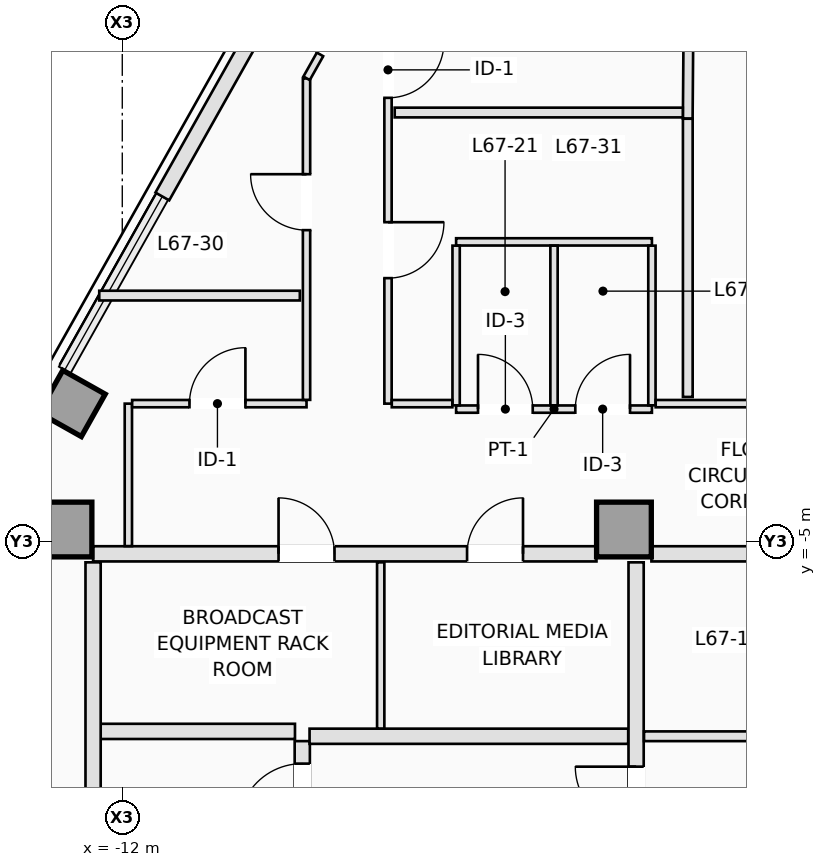
"""IFC4 building model, lengths in metres.
Left out: names, types, materials, properties, quantities, classifications, styles, units other than length and angle.
Written with IfcOpenShell. Run it as: python <this file> out.ifc"""

import sys

from ifc_helpers import new_model, si_unit, direction, frame, frame_2d, origin, origin_2d, place, context, subcontext, project, spatial, rectangle, extrude, element, fill, save


model = new_model("IFC4")
c1 = context("Model", 3, precision=1e-05, world=origin(), true_north=direction((0.0, 1.0)))
c2 = subcontext(c1, "Body", "Model", "MODEL_VIEW")
j1 = project(units=[si_unit("LENGTHUNIT", "METRE"), si_unit("PLANEANGLEUNIT", "RADIAN")], contexts=[c1])
p1 = place(None, origin())
s1 = spatial("IfcSite", under=j1, at=p1, CompositionType="ELEMENT")
p2 = place(p1, origin())
s2 = spatial("IfcBuilding", under=s1, at=p2, CompositionType="ELEMENT")
p3 = place(p2, frame((0.0, 0.0, 242.9)))
s3 = spatial("IfcBuildingStorey", under=s2, at=p3, CompositionType="ELEMENT", Elevation=242.9)
for number, where, z_axis, x_axis in (
    (1, (-12.95, -4.8, 0.0), (0.0, 0.0, 1.0), (1.0, 0.0, 0.0)),
    (2, (-3.75, -4.8, 0.0), (0.0, 0.0, 1.0), (1.0, 0.0, 0.0)),
):
    element("IfcColumn", number, at=place(p3, frame(where, z_axis=z_axis, x_axis=x_axis)), inside=s3, PredefinedType="COLUMN", context=c2, shape_type="SweptSolid", body=[
        extrude(rectangle(XDim=0.9, YDim=0.9, at=origin_2d()), origin(), (0.0, 0.0, 1.0), 3.5),
    ])
p4 = place(p3, frame((-12.825, -2.727, 0.0), z_axis=(0.0, 0.0, 1.0), x_axis=(-0.871575139605, 0.490261946333, 0.0)))
e3 = element("IfcColumn", 3, at=p4, inside=s3, PredefinedType="COLUMN", context=c2, shape_type="SweptSolid", body=[
    extrude(rectangle(XDim=0.8, YDim=0.8, at=origin_2d()), origin(), (0.0, 0.0, 1.0), 3.5),
])
p5 = place(p3, frame((-11.341, 0.677, 0.0), z_axis=(0.0, 0.0, 1.0), x_axis=(0.490268515903, 0.871571444182, 0.0)))
e4 = element("IfcWall", 4, at=p5, inside=s3, PredefinedType="STANDARD", context=c2, shape_type="SweptSolid", body=[
    extrude(rectangle(XDim=3.186, YDim=0.26, at=frame_2d((1.593, 0.0))), origin(), (0.0, 0.0, 1.0), 3.25),
])
p6 = place(p3, frame((-9.04, -10.18, 0.0), z_axis=(0.0, 0.0, 1.0), x_axis=(0.0, 1.0, 0.0)))
e5 = element("IfcWall", 5, at=p6, inside=s3, PredefinedType="PARTITIONING", context=c2, shape_type="SweptSolid", body=[
    extrude(rectangle(XDim=1.9, YDim=0.25, at=frame_2d((0.95, 0.0))), origin(), (0.0, 0.0, 1.0), 3.25),
])
p7 = place(p6, frame((0.48, 0.0, 0.0)))
e6 = element("IfcOpeningElement", 6, at=p7, cuts=e5, PredefinedType="OPENING", context=c2, shape_type="SweptSolid", body=[
    extrude(rectangle(XDim=1.05, YDim=2.15, at=frame_2d((0.525, 1.075))), frame((0.0, 0.135, 0.0), z_axis=(0.0, -1.0, 0.0), x_axis=(1.0, 0.0, 0.0)), (0.0, 0.0, 1.0), 0.27),
])
p8 = place(p3, frame((-12.38, -8.12, 0.0), z_axis=(0.0, 0.0, 1.0), x_axis=(1.0, 0.0, 0.0)))
e7 = element("IfcWall", 7, at=p8, inside=s3, PredefinedType="PARTITIONING", context=c2, shape_type="SweptSolid", body=[
    extrude(rectangle(XDim=3.22, YDim=0.25, at=frame_2d((1.61, 0.0))), origin(), (0.0, 0.0, 1.0), 3.25),
])
p9 = place(p3, frame((-12.48, -10.18, 0.0), z_axis=(0.0, 0.0, 1.0), x_axis=(0.0, 1.0, 0.0)))
e8 = element("IfcWall", 8, at=p9, inside=s3, PredefinedType="PARTITIONING", context=c2, shape_type="SweptSolid", body=[
    extrude(rectangle(XDim=4.84, YDim=0.25, at=frame_2d((2.42, 0.0))), origin(), (0.0, 0.0, 1.0), 3.25),
])
p10 = place(p3, frame((-8.92, -8.2, 0.0), z_axis=(0.0, 0.0, 1.0), x_axis=(1.0, 0.0, 0.0)))
e9 = element("IfcWall", 9, at=p10, inside=s3, PredefinedType="PARTITIONING", context=c2, shape_type="SweptSolid", body=[
    extrude(rectangle(XDim=5.24, YDim=0.25, at=frame_2d((2.62, 0.0))), origin(), (0.0, 0.0, 1.0), 3.25),
])
p11 = place(p3, frame((-3.55, -15.898, 0.0), z_axis=(0.0, 0.0, 1.0), x_axis=(0.0, 1.0, 0.0)))
e10 = element("IfcWall", 10, at=p11, inside=s3, PredefinedType="PARTITIONING", context=c2, shape_type="SweptSolid", body=[
    extrude(rectangle(XDim=10.558, YDim=0.25, at=frame_2d((5.279, 0.0))), origin(), (0.0, 0.0, 1.0), 3.25),
])
p12 = place(p11, frame((6.198, 0.0, 0.0)))
e11 = element("IfcOpeningElement", 11, at=p12, cuts=e10, PredefinedType="OPENING", context=c2, shape_type="SweptSolid", body=[
    extrude(rectangle(XDim=1.0, YDim=2.15, at=frame_2d((0.5, 1.075))), frame((0.0, 0.135, 0.0), z_axis=(0.0, -1.0, 0.0), x_axis=(1.0, 0.0, 0.0)), (0.0, 0.0, 1.0), 0.27),
])
p13 = place(p3, frame((-12.48, -5.2, 0.0), z_axis=(0.0, 0.0, 1.0), x_axis=(1.0, 0.0, 0.0)))
e12 = element("IfcWall", 12, at=p13, inside=s3, PredefinedType="PARTITIONING", context=c2, shape_type="SweptSolid", body=[
    extrude(rectangle(XDim=8.278, YDim=0.25, at=frame_2d((4.139, 0.0))), origin(), (0.0, 0.0, 1.0), 3.25),
])
p14 = place(p13, frame((3.05, 0.0, 0.0)))
e13 = element("IfcOpeningElement", 13, at=p14, cuts=e12, PredefinedType="OPENING", context=c2, shape_type="SweptSolid", body=[
    extrude(rectangle(XDim=0.92, YDim=2.12, at=frame_2d((0.46, 1.06))), frame((0.0, 0.135, 0.0), z_axis=(0.0, -1.0, 0.0), x_axis=(1.0, 0.0, 0.0)), (0.0, 0.0, 1.0), 0.27),
])
p15 = place(p13, frame((6.15, 0.0, 0.0)))
e14 = element("IfcOpeningElement", 14, at=p15, cuts=e12, PredefinedType="OPENING", context=c2, shape_type="SweptSolid", body=[
    extrude(rectangle(XDim=0.92, YDim=2.12, at=frame_2d((0.46, 1.06))), frame((0.0, 0.135, 0.0), z_axis=(0.0, -1.0, 0.0), x_axis=(1.0, 0.0, 0.0)), (0.0, 0.0, 1.0), 0.27),
])
p16 = place(p3, frame((-3.298, -5.2, 0.0), z_axis=(0.0, 0.0, 1.0), x_axis=(1.0, 0.0, 0.0)))
e15 = element("IfcWall", 15, at=p16, inside=s3, PredefinedType="PARTITIONING", context=c2, shape_type="SweptSolid", body=[
    extrude(rectangle(XDim=2.348, YDim=0.25, at=frame_2d((1.174, 0.0))), origin(), (0.0, 0.0, 1.0), 3.25),
])
p17 = place(p3, frame((-7.75, -8.073, 0.0), z_axis=(0.0, 0.0, 1.0), x_axis=(0.0, 1.0, 0.0)))
e16 = element("IfcWall", 16, at=p17, inside=s3, PredefinedType="PARTITIONING", context=c2, shape_type="SweptSolid", body=[
    extrude(rectangle(XDim=2.733, YDim=0.12, at=frame_2d((1.366, 0.0))), origin(), (0.0, 0.0, 1.0), 3.25),
])
p18 = place(p3, frame((-3.42, -8.2, 0.0), z_axis=(0.0, 0.0, 1.0), x_axis=(1.0, 0.0, 0.0)))
e17 = element("IfcWall", 17, at=p18, inside=s3, PredefinedType="PARTITIONING", context=c2, shape_type="SweptSolid", body=[
    extrude(rectangle(XDim=6.84, YDim=0.16, at=frame_2d((3.42, 0.0))), origin(), (0.0, 0.0, 1.0), 3.25),
])
p19 = place(p18, frame((2.92, 0.0, 0.0)))
e18 = element("IfcOpeningElement", 18, at=p19, cuts=e17, PredefinedType="OPENING", context=c2, shape_type="SweptSolid", body=[
    extrude(rectangle(XDim=1.0, YDim=2.15, at=frame_2d((0.5, 1.075))), frame((0.0, 0.09, 0.0), z_axis=(0.0, -1.0, 0.0), x_axis=(1.0, 0.0, 0.0)), (0.0, 0.0, 1.0), 0.18),
])
p20 = place(p3, frame((-6.51, -2.82, 0.0), z_axis=(0.0, 0.0, 1.0), x_axis=(1.0, 0.0, 0.0)))
e19 = element("IfcWall", 19, at=p20, inside=s3, PredefinedType="PARTITIONING", context=c2, shape_type="SweptSolid", body=[
    extrude(rectangle(XDim=3.22, YDim=0.12, at=frame_2d((1.61, 0.0))), origin(), (0.0, 0.0, 1.0), 2.943),
])
p21 = place(p20, frame((0.36, 0.0, 0.0)))
e20 = element("IfcOpeningElement", 20, at=p21, cuts=e19, PredefinedType="OPENING", context=c2, shape_type="SweptSolid", body=[
    extrude(rectangle(XDim=0.9, YDim=2.12, at=frame_2d((0.45, 1.06))), frame((0.0, 0.07, 0.0), z_axis=(0.0, -1.0, 0.0), x_axis=(1.0, 0.0, 0.0)), (0.0, 0.0, 1.0), 0.14),
])
p22 = place(p20, frame((1.96, 0.0, 0.0)))
e21 = element("IfcOpeningElement", 21, at=p22, cuts=e19, PredefinedType="OPENING", context=c2, shape_type="SweptSolid", body=[
    extrude(rectangle(XDim=0.9, YDim=2.12, at=frame_2d((0.45, 1.06))), frame((0.0, 0.07, 0.0), z_axis=(0.0, -1.0, 0.0), x_axis=(1.0, 0.0, 0.0)), (0.0, 0.0, 1.0), 0.14),
])
p23 = place(p3, frame((-6.51, -0.07, 0.0), z_axis=(0.0, 0.0, 1.0), x_axis=(1.0, 0.0, 0.0)))
e22 = element("IfcWall", 22, at=p23, inside=s3, PredefinedType="PARTITIONING", context=c2, shape_type="SweptSolid", body=[
    extrude(rectangle(XDim=3.22, YDim=0.12, at=frame_2d((1.61, 0.0))), origin(), (0.0, 0.0, 1.0), 3.25),
])
for number, where, z_axis, x_axis in (
    (23, (-6.51, -2.758, 0.0), (0.0, 0.0, 1.0), (0.0, 1.0, 0.0)),
    (24, (-4.9, -2.758, 0.0), (0.0, 0.0, 1.0), (0.0, 1.0, 0.0)),
):
    element("IfcWall", number, at=place(p3, frame(where, z_axis=z_axis, x_axis=x_axis)), inside=s3, PredefinedType="PARTITIONING", context=c2, shape_type="SweptSolid", body=[
        extrude(rectangle(XDim=2.626, YDim=0.12, at=frame_2d((1.313, 0.0))), origin(), (0.0, 0.0, 1.0), 3.25),
    ])
p24 = place(p3, frame((-3.29, -2.758, 0.0), z_axis=(0.0, 0.0, 1.0), x_axis=(0.0, 1.0, 0.0)))
e25 = element("IfcWall", 25, at=p24, inside=s3, PredefinedType="PARTITIONING", context=c2, shape_type="SweptSolid", body=[
    extrude(rectangle(XDim=2.626, YDim=0.12, at=frame_2d((1.313, 0.0))), origin(), (0.0, 0.0, 1.0), 2.79),
])
p25 = place(p3, frame((-11.9, -5.073, 0.0), z_axis=(0.0, 0.0, 1.0), x_axis=(0.0, 1.0, 0.0)))
e26 = element("IfcWall", 26, at=p25, inside=s3, PredefinedType="PARTITIONING", context=c2, shape_type="SweptSolid", body=[
    extrude(rectangle(XDim=2.343, YDim=0.12, at=frame_2d((1.171, 0.0))), origin(), (0.0, 0.0, 1.0), 3.25),
])
p26 = place(p3, frame((-11.838, -2.73, 0.0), z_axis=(0.0, 0.0, 1.0), x_axis=(1.0, 0.0, 0.0)))
e27 = element("IfcWall", 27, at=p26, inside=s3, PredefinedType="PARTITIONING", context=c2, shape_type="SweptSolid", body=[
    extrude(rectangle(XDim=2.868, YDim=0.12, at=frame_2d((1.434, 0.0))), origin(), (0.0, 0.0, 1.0), 3.25),
])
p27 = place(p26, frame((0.943, 0.0, 0.0)))
e28 = element("IfcOpeningElement", 28, at=p27, cuts=e27, PredefinedType="OPENING", context=c2, shape_type="SweptSolid", body=[
    extrude(rectangle(XDim=0.92, YDim=2.12, at=frame_2d((0.46, 1.06))), frame((0.0, 0.07, 0.0), z_axis=(0.0, -1.0, 0.0), x_axis=(1.0, 0.0, 0.0)), (0.0, 0.0, 1.0), 0.14),
])
p28 = place(p3, frame((-8.97, -2.668, 0.0), z_axis=(0.0, 0.0, 1.0), x_axis=(0.0, 1.0, 0.0)))
e29 = element("IfcWall", 29, at=p28, inside=s3, PredefinedType="PARTITIONING", context=c2, shape_type="SweptSolid", body=[
    extrude(rectangle(XDim=5.286, YDim=0.12, at=frame_2d((2.643, 0.0))), origin(), (0.0, 0.0, 1.0), 3.25),
])
p29 = place(p28, frame((2.791, 0.0, 0.0)))
e30 = element("IfcOpeningElement", 30, at=p29, cuts=e29, PredefinedType="OPENING", context=c2, shape_type="SweptSolid", body=[
    extrude(rectangle(XDim=0.92, YDim=2.12, at=frame_2d((0.46, 1.06))), frame((0.0, 0.07, 0.0), z_axis=(0.0, -1.0, 0.0), x_axis=(1.0, 0.0, 0.0)), (0.0, 0.0, 1.0), 0.14),
])
p30 = place(p3, frame((-8.969, 2.62, 0.0), z_axis=(0.0, 0.0, 1.0), x_axis=(0.490341880416, 0.871530171773, 0.0)))
e31 = element("IfcWall", 31, at=p30, inside=s3, PredefinedType="PARTITIONING", context=c2, shape_type="SweptSolid", body=[
    extrude(rectangle(XDim=2.731, YDim=0.12, at=frame_2d((1.365, 0.0))), origin(), (0.0, 0.0, 1.0), 3.25),
])
p31 = place(p30, frame((0.451, 0.0, 0.0)))
e32 = element("IfcOpeningElement", 32, at=p31, cuts=e31, PredefinedType="OPENING", context=c2, shape_type="SweptSolid", body=[
    extrude(rectangle(XDim=0.88, YDim=2.12, at=frame_2d((0.44, 1.06))), frame((0.0, 0.07, 0.0), z_axis=(0.0, -1.0, 0.0), x_axis=(1.0, 0.0, 0.0)), (0.0, 0.0, 1.0), 0.14),
])
p32 = place(p3, frame((-7.63, 4.874, 0.0), z_axis=(0.0, 0.0, 1.0), x_axis=(0.0, -1.0, 0.0)))
e33 = element("IfcWall", 33, at=p32, inside=s3, PredefinedType="PARTITIONING", context=c2, shape_type="SweptSolid", body=[
    extrude(rectangle(XDim=7.604, YDim=0.12, at=frame_2d((3.802, 0.0))), origin(), (0.0, 0.0, 1.0), 3.25),
])
p33 = place(p32, frame((1.655, 0.0, 0.0)))
e34 = element("IfcOpeningElement", 34, at=p33, cuts=e33, PredefinedType="OPENING", context=c2, shape_type="SweptSolid", body=[
    extrude(rectangle(XDim=0.92, YDim=2.12, at=frame_2d((0.46, 1.06))), frame((0.0, 0.07, 0.0), z_axis=(0.0, -1.0, 0.0), x_axis=(1.0, 0.0, 0.0)), (0.0, 0.0, 1.0), 0.14),
])
p34 = place(p32, frame((4.62, 0.0, 0.0)))
e35 = element("IfcOpeningElement", 35, at=p34, cuts=e33, PredefinedType="OPENING", context=c2, shape_type="SweptSolid", body=[
    extrude(rectangle(XDim=0.92, YDim=2.12, at=frame_2d((0.46, 1.06))), frame((0.0, 0.07, 0.0), z_axis=(0.0, -1.0, 0.0), x_axis=(1.0, 0.0, 0.0)), (0.0, 0.0, 1.0), 0.14),
])
p35 = place(p3, frame((-7.568, -2.73, 0.0), z_axis=(0.0, 0.0, 1.0), x_axis=(1.0, 0.0, 0.0)))
e36 = element("IfcWall", 36, at=p35, inside=s3, PredefinedType="PARTITIONING", context=c2, shape_type="SweptSolid", body=[
    extrude(rectangle(XDim=0.996, YDim=0.12, at=frame_2d((0.498, 0.0))), origin(), (0.0, 0.0, 1.0), 3.25),
])
p36 = place(p3, frame((-3.228, -2.73, 0.0), z_axis=(0.0, 0.0, 1.0), x_axis=(1.0, 0.0, 0.0)))
e37 = element("IfcWall", 37, at=p36, inside=s3, PredefinedType="PARTITIONING", context=c2, shape_type="SweptSolid", body=[
    extrude(rectangle(XDim=6.456, YDim=0.12, at=frame_2d((3.228, 0.0))), origin(), (0.0, 0.0, 1.0), 2.943),
])
p37 = place(p36, frame((2.949, 0.0, 0.0)))
e38 = element("IfcOpeningElement", 38, at=p37, cuts=e37, PredefinedType="OPENING", context=c2, shape_type="SweptSolid", body=[
    extrude(rectangle(XDim=0.92, YDim=2.12, at=frame_2d((0.46, 1.06))), frame((0.0, 0.07, 0.0), z_axis=(0.0, -1.0, 0.0), x_axis=(1.0, 0.0, 0.0)), (0.0, 0.0, 1.0), 0.14),
])
p38 = place(p3, frame((-2.659, 7.494, 0.0), z_axis=(0.0, 0.0, 1.0), x_axis=(-0.0074963718, -0.99997190181, 0.0)))
e39 = element("IfcWall", 39, at=p38, inside=s3, PredefinedType="PARTITIONING", context=c2, shape_type="SweptSolid", body=[
    extrude(rectangle(XDim=5.537, YDim=0.16, at=frame_2d((2.768, 0.0))), origin(), (0.0, 0.0, 1.0), 3.25),
])
p39 = place(p3, frame((-2.782, 2.057, 0.0), z_axis=(0.0, 0.0, 1.0), x_axis=(-1.0, 0.0, 0.0)))
e40 = element("IfcWall", 40, at=p39, inside=s3, PredefinedType="PARTITIONING", context=c2, shape_type="SweptSolid", body=[
    extrude(rectangle(XDim=4.738, YDim=0.16, at=frame_2d((2.369, 0.0))), origin(), (0.0, 0.0, 1.0), 2.943),
])
p40 = place(p3, frame((-2.7, -2.62, 0.0), z_axis=(0.0, 0.0, 1.0), x_axis=(0.0, 1.0, 0.0)))
e41 = element("IfcWall", 41, at=p40, inside=s3, PredefinedType="PARTITIONING", context=c2, shape_type="SweptSolid", body=[
    extrude(rectangle(XDim=4.575, YDim=0.16, at=frame_2d((2.288, 0.0))), origin(), (0.0, 0.0, 1.0), 3.25),
])
p41 = place(p3, frame((-9.08, -0.953, 0.0), z_axis=(0.0, 0.0, 1.0), x_axis=(-1.0, 0.0, 0.0)))
e42 = element("IfcWall", 42, at=p41, inside=s3, PredefinedType="PARTITIONING", context=c2, shape_type="SweptSolid", body=[
    extrude(rectangle(XDim=3.299, YDim=0.16, at=frame_2d((1.649, 0.0))), origin(), (0.0, 0.0, 1.0), 3.25),
])
p42 = place(p7, origin())
e43 = element("IfcDoor", 43, at=p42, inside=s3, OperationType="SINGLE_SWING_LEFT", PredefinedType="DOOR", context=c2, shape_type="SweptSolid", body=[
    extrude(rectangle(XDim=1.05, YDim=2.15, at=frame_2d((0.525, 1.075))), frame((0.0, 0.025, 0.0), z_axis=(0.0, -1.0, 0.0), x_axis=(1.0, 0.0, 0.0)), (0.0, 0.0, 1.0), 0.05),
])
fill(e6, e43)
p43 = place(p12, origin())
e44 = element("IfcDoor", 44, at=p43, inside=s3, OperationType="SINGLE_SWING_RIGHT", PredefinedType="DOOR", context=c2, shape_type="SweptSolid", body=[
    extrude(rectangle(XDim=1.0, YDim=2.15, at=frame_2d((0.5, 1.075))), frame((0.0, 0.025, 0.0), z_axis=(0.0, -1.0, 0.0), x_axis=(1.0, 0.0, 0.0)), (0.0, 0.0, 1.0), 0.05),
])
fill(e11, e44)
p44 = place(p14, origin())
e45 = element("IfcDoor", 45, at=p44, inside=s3, OperationType="SINGLE_SWING_LEFT", PredefinedType="DOOR", context=c2, shape_type="SweptSolid", body=[
    extrude(rectangle(XDim=0.92, YDim=2.12, at=frame_2d((0.46, 1.06))), frame((0.0, 0.025, 0.0), z_axis=(0.0, -1.0, 0.0), x_axis=(1.0, 0.0, 0.0)), (0.0, 0.0, 1.0), 0.05),
])
fill(e13, e45)
p45 = place(p15, origin())
e46 = element("IfcDoor", 46, at=p45, inside=s3, OperationType="SINGLE_SWING_RIGHT", PredefinedType="DOOR", context=c2, shape_type="SweptSolid", body=[
    extrude(rectangle(XDim=0.92, YDim=2.12, at=frame_2d((0.46, 1.06))), frame((0.0, 0.025, 0.0), z_axis=(0.0, -1.0, 0.0), x_axis=(1.0, 0.0, 0.0)), (0.0, 0.0, 1.0), 0.05),
])
fill(e14, e46)
p46 = place(p21, origin())
e47 = element("IfcDoor", 47, at=p46, inside=s3, OperationType="SINGLE_SWING_LEFT", PredefinedType="DOOR", context=c2, shape_type="SweptSolid", body=[
    extrude(rectangle(XDim=0.9, YDim=2.12, at=frame_2d((0.45, 1.06))), frame((0.0, 0.025, 0.0), z_axis=(0.0, -1.0, 0.0), x_axis=(1.0, 0.0, 0.0)), (0.0, 0.0, 1.0), 0.05),
])
fill(e20, e47)
p47 = place(p22, origin())
e48 = element("IfcDoor", 48, at=p47, inside=s3, OperationType="SINGLE_SWING_RIGHT", PredefinedType="DOOR", context=c2, shape_type="SweptSolid", body=[
    extrude(rectangle(XDim=0.9, YDim=2.12, at=frame_2d((0.45, 1.06))), frame((0.0, 0.025, 0.0), z_axis=(0.0, -1.0, 0.0), x_axis=(1.0, 0.0, 0.0)), (0.0, 0.0, 1.0), 0.05),
])
fill(e21, e48)
p48 = place(p31, origin())
e49 = element("IfcDoor", 49, at=p48, inside=s3, OperationType="SINGLE_SWING_RIGHT", PredefinedType="DOOR", context=c2, shape_type="SweptSolid", body=[
    extrude(rectangle(XDim=0.88, YDim=2.12, at=frame_2d((0.44, 1.06))), frame((0.0, 0.025, 0.0), z_axis=(0.0, -1.0, 0.0), x_axis=(1.0, 0.0, 0.0)), (0.0, 0.0, 1.0), 0.05),
])
fill(e32, e49)
p49 = place(p33, origin())
e50 = element("IfcDoor", 50, at=p49, inside=s3, OperationType="SINGLE_SWING_LEFT", PredefinedType="DOOR", context=c2, shape_type="SweptSolid", body=[
    extrude(rectangle(XDim=0.92, YDim=2.12, at=frame_2d((0.46, 1.06))), frame((0.0, 0.025, 0.0), z_axis=(0.0, -1.0, 0.0), x_axis=(1.0, 0.0, 0.0)), (0.0, 0.0, 1.0), 0.05),
])
fill(e34, e50)
p50 = place(p29, origin())
e51 = element("IfcDoor", 51, at=p50, inside=s3, OperationType="SINGLE_SWING_RIGHT", PredefinedType="DOOR", context=c2, shape_type="SweptSolid", body=[
    extrude(rectangle(XDim=0.92, YDim=2.12, at=frame_2d((0.46, 1.06))), frame((0.0, 0.025, 0.0), z_axis=(0.0, -1.0, 0.0), x_axis=(1.0, 0.0, 0.0)), (0.0, 0.0, 1.0), 0.05),
])
fill(e30, e51)
p51 = place(p34, origin())
e52 = element("IfcDoor", 52, at=p51, inside=s3, OperationType="SINGLE_SWING_LEFT", PredefinedType="DOOR", context=c2, shape_type="SweptSolid", body=[
    extrude(rectangle(XDim=0.92, YDim=2.12, at=frame_2d((0.46, 1.06))), frame((0.0, 0.025, 0.0), z_axis=(0.0, -1.0, 0.0), x_axis=(1.0, 0.0, 0.0)), (0.0, 0.0, 1.0), 0.05),
])
fill(e35, e52)
p52 = place(p27, origin())
e53 = element("IfcDoor", 53, at=p52, inside=s3, OperationType="SINGLE_SWING_RIGHT", PredefinedType="DOOR", context=c2, shape_type="SweptSolid", body=[
    extrude(rectangle(XDim=0.92, YDim=2.12, at=frame_2d((0.46, 1.06))), frame((0.0, 0.025, 0.0), z_axis=(0.0, -1.0, 0.0), x_axis=(1.0, 0.0, 0.0)), (0.0, 0.0, 1.0), 0.05),
])
fill(e28, e53)
save(model, sys.argv[1])
